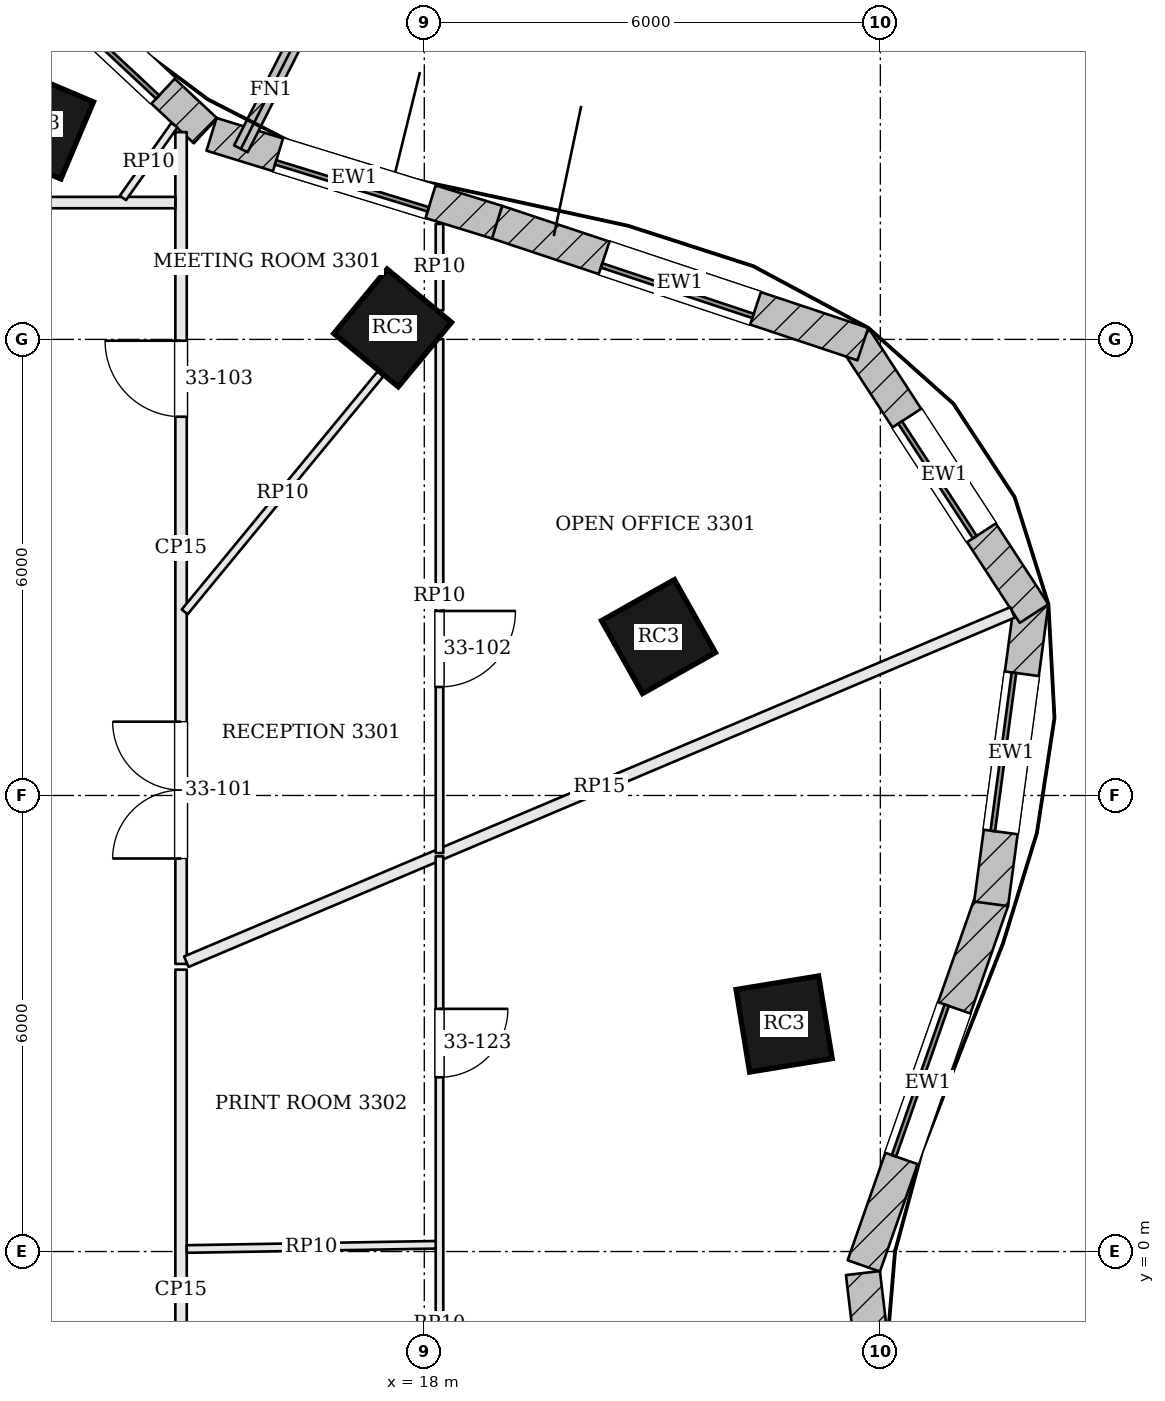
"""IFC4 building model, lengths in metres.
Left out: names, types, materials, properties, quantities, classifications, styles, units other than length and angle.
Written with IfcOpenShell. Run it as: python <this file> out.ifc"""

import sys

from ifc_helpers import new_model, si_unit, direction, frame, frame_2d, origin, origin_2d, place, context, subcontext, project, spatial, rectangle, extrude, element, fill, save


model = new_model("IFC4")
c1 = context("Model", 3, precision=1e-05, world=origin(), true_north=direction((0.0, 1.0)))
c2 = subcontext(c1, "Body", "Model", "MODEL_VIEW")
j1 = project(units=[si_unit("LENGTHUNIT", "METRE"), si_unit("PLANEANGLEUNIT", "RADIAN")], contexts=[c1])
p1 = place(None, origin())
s1 = spatial("IfcSite", under=j1, at=p1, CompositionType="ELEMENT")
p2 = place(p1, origin())
s2 = spatial("IfcBuilding", under=s1, at=p2, CompositionType="ELEMENT")
p3 = place(p2, frame((0.0, 0.0, 138.3)))
s3 = spatial("IfcBuildingStorey", under=s2, at=p3, CompositionType="ELEMENT", Elevation=138.3)
for number, where, z_axis, x_axis in (
    (1, (22.734, 2.993, 0.0), (0.0, 0.0, 1.0), (-0.162, 0.987, 0.0)),
    (2, (21.081, 8.09, 0.0), (0.0, 0.0, 1.0), (-0.49, 0.872, 0.0)),
    (3, (17.584, 12.151, 0.0), (0.0, 0.0, 1.0), (-0.771, 0.637, 0.0)),
    (4, (12.927, 14.832, 0.0), (0.0, 0.0, 1.0), (-0.921, 0.389, 0.0)),
):
    element("IfcColumn", number, at=place(p3, frame(where, z_axis=z_axis, x_axis=x_axis)), inside=s3, PredefinedType="COLUMN", context=c2, shape_type="SweptSolid", body=[
        extrude(rectangle(XDim=1.1, YDim=1.1, at=origin_2d()), origin(), (0.0, 0.0, 1.0), 3.9),
    ])
p4 = place(p3, frame((23.782, -0.189, 0.0), z_axis=(0.0, 0.0, 1.0), x_axis=(0.330794307703, 0.943702880144, 0.0)))
e5 = element("IfcWall", 5, at=p4, inside=s3, PredefinedType="SOLIDWALL", context=c2, shape_type="SweptSolid", body=[
    extrude(rectangle(XDim=5.095, YDim=0.45, at=frame_2d((2.548, 0.0))), origin(), (0.0, 0.0, 1.0), 3.7),
])
p5 = place(p4, frame((1.498, 0.0, 0.9)))
e6 = element("IfcOpeningElement", 6, at=p5, cuts=e5, PredefinedType="OPENING", context=c2, shape_type="SweptSolid", body=[
    extrude(rectangle(XDim=2.1, YDim=2.3, at=frame_2d((1.05, 1.15))), frame((0.0, 0.235, 0.0), z_axis=(0.0, -1.0, 0.0), x_axis=(1.0, 0.0, 0.0)), (0.0, 0.0, 1.0), 0.47),
])
p6 = place(p3, frame((25.457, 4.575, 0.0), z_axis=(0.0, 0.0, 1.0), x_axis=(0.132475046402, 0.991186340746, 0.0)))
e7 = element("IfcWall", 7, at=p6, inside=s3, PredefinedType="SOLIDWALL", context=c2, shape_type="SweptSolid", body=[
    extrude(rectangle(XDim=4.007, YDim=0.45, at=frame_2d((2.003, 0.0))), origin(), (0.0, 0.0, 1.0), 3.7),
])
p7 = place(p6, frame((0.953, 0.0, 0.9)))
e8 = element("IfcOpeningElement", 8, at=p7, cuts=e7, PredefinedType="OPENING", context=c2, shape_type="SweptSolid", body=[
    extrude(rectangle(XDim=2.1, YDim=2.3, at=frame_2d((1.05, 1.15))), frame((0.0, 0.235, 0.0), z_axis=(0.0, -1.0, 0.0), x_axis=(1.0, 0.0, 0.0)), (0.0, 0.0, 1.0), 0.47),
])
p8 = place(p3, frame((26.022, 8.393, 0.0), z_axis=(0.0, 0.0, 1.0), x_axis=(-0.545637310328, 0.838021435035, 0.0)))
e9 = element("IfcWall", 9, at=p8, inside=s3, PredefinedType="SOLIDWALL", context=c2, shape_type="SweptSolid", body=[
    extrude(rectangle(XDim=4.336, YDim=0.45, at=frame_2d((2.168, 0.0))), origin(), (0.0, 0.0, 1.0), 3.7),
])
p9 = place(p8, frame((1.268, 0.0, 0.9)))
e10 = element("IfcOpeningElement", 10, at=p9, cuts=e9, PredefinedType="OPENING", context=c2, shape_type="SweptSolid", body=[
    extrude(rectangle(XDim=1.8, YDim=2.3, at=frame_2d((0.9, 1.15))), frame((0.0, 0.235, 0.0), z_axis=(0.0, -1.0, 0.0), x_axis=(1.0, 0.0, 0.0)), (0.0, 0.0, 1.0), 0.47),
])
p10 = place(p3, frame((23.77, 11.938, 0.0), z_axis=(0.0, 0.0, 1.0), x_axis=(-0.948673679101, 0.316256621402, 0.0)))
e11 = element("IfcWall", 11, at=p10, inside=s3, PredefinedType="SOLIDWALL", context=c2, shape_type="SweptSolid", body=[
    extrude(rectangle(XDim=5.076, YDim=0.45, at=frame_2d((2.538, 0.0))), origin(), (0.0, 0.0, 1.0), 3.7),
])
p11 = place(p10, frame((1.488, 0.0, 0.9)))
e12 = element("IfcOpeningElement", 12, at=p11, cuts=e11, PredefinedType="OPENING", context=c2, shape_type="SweptSolid", body=[
    extrude(rectangle(XDim=2.1, YDim=2.3, at=frame_2d((1.05, 1.15))), frame((0.0, 0.235, 0.0), z_axis=(0.0, -1.0, 0.0), x_axis=(1.0, 0.0, 0.0)), (0.0, 0.0, 1.0), 0.47),
])
p12 = place(p3, frame((18.958, 13.542, 0.0), z_axis=(0.0, 0.0, 1.0), x_axis=(-0.955792437529, 0.294042201668, 0.0)))
e13 = element("IfcWall", 13, at=p12, inside=s3, PredefinedType="SOLIDWALL", context=c2, shape_type="SweptSolid", body=[
    extrude(rectangle(XDim=3.931, YDim=0.45, at=frame_2d((1.965, 0.0))), origin(), (0.0, 0.0, 1.0), 3.7),
])
p13 = place(p12, frame((0.915, 0.0, 0.9)))
e14 = element("IfcOpeningElement", 14, at=p13, cuts=e13, PredefinedType="OPENING", context=c2, shape_type="SweptSolid", body=[
    extrude(rectangle(XDim=2.1, YDim=2.3, at=frame_2d((1.05, 1.15))), frame((0.0, 0.235, 0.0), z_axis=(0.0, -1.0, 0.0), x_axis=(1.0, 0.0, 0.0)), (0.0, 0.0, 1.0), 0.47),
])
p14 = place(p3, frame((15.121, 14.745, 0.0), z_axis=(0.0, 0.0, 1.0), x_axis=(-0.730618259172, 0.68278617397, 0.0)))
e15 = element("IfcWall", 15, at=p14, inside=s3, PredefinedType="SOLIDWALL", context=c2, shape_type="SweptSolid", body=[
    extrude(rectangle(XDim=3.624, YDim=0.45, at=frame_2d((1.812, 0.0))), origin(), (0.0, 0.0, 1.0), 3.7),
])
p15 = place(p14, frame((0.762, 0.0, 0.9)))
e16 = element("IfcOpeningElement", 16, at=p15, cuts=e15, PredefinedType="OPENING", context=c2, shape_type="SweptSolid", body=[
    extrude(rectangle(XDim=2.1, YDim=2.3, at=frame_2d((1.05, 1.15))), frame((0.0, 0.235, 0.0), z_axis=(0.0, -1.0, 0.0), x_axis=(1.0, 0.0, 0.0)), (0.0, 0.0, 1.0), 0.47),
])
p16 = place(p3, frame((24.201, -3.915, 0.0), z_axis=(0.0, 0.0, 1.0), x_axis=(-0.117623597589, 0.993058250703, 0.0)))
e17 = element("IfcWall", 17, at=p16, inside=s3, PredefinedType="SOLIDWALL", context=c2, shape_type="SweptSolid", body=[
    extrude(rectangle(XDim=3.657, YDim=0.45, at=frame_2d((1.829, 0.0))), origin(), (0.0, 0.0, 1.0), 3.7),
])
p17 = place(p16, frame((0.779, 0.0, 0.9)))
e18 = element("IfcOpeningElement", 18, at=p17, cuts=e17, PredefinedType="OPENING", context=c2, shape_type="SweptSolid", body=[
    extrude(rectangle(XDim=2.1, YDim=2.3, at=frame_2d((1.05, 1.15))), frame((0.0, 0.235, 0.0), z_axis=(0.0, -1.0, 0.0), x_axis=(1.0, 0.0, 0.0)), (0.0, 0.0, 1.0), 0.47),
])
p18 = place(p3, frame((15.587, 14.507, 0.0), z_axis=(0.0, 0.0, 1.0), x_axis=(0.452117231361, 0.89195852432, 0.0)))
e19 = element("IfcWall", 19, at=p18, inside=s3, PredefinedType="SOLIDWALL", context=c2, shape_type="SweptSolid", body=[
    extrude(rectangle(XDim=1.75, YDim=0.2, at=frame_2d((0.875, 0.0))), origin(), (0.0, 0.0, 1.0), 3.7),
])
p19 = place(p3, frame((14.8, 3.784, 0.0), z_axis=(0.0, 0.0, 1.0), x_axis=(0.0, 1.0, 0.0)))
e20 = element("IfcWall", 20, at=p19, inside=s3, PredefinedType="PARTITIONING", context=c2, shape_type="SweptSolid", body=[
    extrude(rectangle(XDim=10.943, YDim=0.15, at=frame_2d((5.472, 0.0))), origin(), (0.0, 0.0, 1.0), 3.198),
])
p20 = place(p19, frame((1.387, 0.0, 0.0)))
e21 = element("IfcOpeningElement", 21, at=p20, cuts=e20, PredefinedType="OPENING", context=c2, shape_type="SweptSolid", body=[
    extrude(rectangle(XDim=1.8, YDim=2.1, at=frame_2d((0.9, 1.05))), frame((0.0, 0.085, 0.0), z_axis=(0.0, -1.0, 0.0), x_axis=(1.0, 0.0, 0.0)), (0.0, 0.0, 1.0), 0.17),
])
p21 = place(p19, frame((7.199, 0.0, 0.0)))
e22 = element("IfcOpeningElement", 22, at=p21, cuts=e20, PredefinedType="OPENING", context=c2, shape_type="SweptSolid", body=[
    extrude(rectangle(XDim=1.0, YDim=2.4, at=frame_2d((0.5, 1.2))), frame((0.0, 0.085, 0.0), z_axis=(0.0, -1.0, 0.0), x_axis=(1.0, 0.0, 0.0)), (0.0, 0.0, 1.0), 0.17),
])
p22 = place(p3, frame((14.725, 13.8, 0.0), z_axis=(0.0, 0.0, 1.0), x_axis=(-1.0, 0.0, 0.0)))
e23 = element("IfcWall", 23, at=p22, inside=s3, PredefinedType="PARTITIONING", context=c2, shape_type="SweptSolid", body=[
    extrude(rectangle(XDim=11.638, YDim=0.15, at=frame_2d((5.819, 0.0))), origin(), (0.0, 0.0, 1.0), 3.198),
])
p23 = place(p22, frame((2.95, 0.0, 0.0)))
e24 = element("IfcOpeningElement", 24, at=p23, cuts=e23, PredefinedType="OPENING", context=c2, shape_type="SweptSolid", body=[
    extrude(rectangle(XDim=1.0, YDim=2.1, at=frame_2d((0.5, 1.05))), frame((0.0, 0.085, 0.0), z_axis=(0.0, -1.0, 0.0), x_axis=(1.0, 0.0, 0.0)), (0.0, 0.0, 1.0), 0.17),
])
p24 = place(p22, frame((8.35, 0.0, 0.0)))
e25 = element("IfcOpeningElement", 25, at=p24, cuts=e23, PredefinedType="OPENING", context=c2, shape_type="SweptSolid", body=[
    extrude(rectangle(XDim=1.0, YDim=2.1, at=frame_2d((0.5, 1.05))), frame((0.0, 0.085, 0.0), z_axis=(0.0, -1.0, 0.0), x_axis=(1.0, 0.0, 0.0)), (0.0, 0.0, 1.0), 0.17),
])
p25 = place(p3, frame((25.739, 8.408, 0.0), z_axis=(0.0, 0.0, 1.0), x_axis=(-0.921062306608, -0.389415237692, 0.0)))
e26 = element("IfcWall", 26, at=p25, inside=s3, PredefinedType="PARTITIONING", context=c2, shape_type="SweptSolid", body=[
    extrude(rectangle(XDim=11.801, YDim=0.15, at=frame_2d((5.9, 0.0))), origin(), (0.0, 0.0, 1.0), 3.198),
])
p26 = place(p3, frame((14.8, -4.725, 0.0), z_axis=(0.0, 0.0, 1.0), x_axis=(0.0, 1.0, 0.0)))
e27 = element("IfcWall", 27, at=p26, inside=s3, PredefinedType="PARTITIONING", context=c2, shape_type="SweptSolid", body=[
    extrude(rectangle(XDim=8.434, YDim=0.15, at=frame_2d((4.217, 0.0))), origin(), (0.0, 0.0, 1.0), 3.198),
])
p27 = place(p26, frame((0.45, 0.0, 0.0)))
e28 = element("IfcOpeningElement", 28, at=p27, cuts=e27, PredefinedType="OPENING", context=c2, shape_type="SweptSolid", body=[
    extrude(rectangle(XDim=1.0, YDim=2.4, at=frame_2d((0.5, 1.2))), frame((0.0, 0.085, 0.0), z_axis=(0.0, -1.0, 0.0), x_axis=(1.0, 0.0, 0.0)), (0.0, 0.0, 1.0), 0.17),
])
p28 = place(p3, frame((18.2, 13.519, 0.0), z_axis=(0.0, 0.0, 1.0), x_axis=(0.0, -1.0, 0.0)))
e29 = element("IfcWall", 29, at=p28, inside=s3, PredefinedType="PARTITIONING", context=c2, shape_type="SweptSolid", body=[
    extrude(rectangle(XDim=1.138, YDim=0.1, at=frame_2d((0.569, 0.0))), origin(), (0.0, 0.0, 1.0), 3.184),
])
p29 = place(p3, frame((18.2, 12.001, 0.0), z_axis=(0.0, 0.0, 1.0), x_axis=(0.0, -1.0, 0.0)))
e30 = element("IfcWall", 30, at=p29, inside=s3, PredefinedType="PARTITIONING", context=c2, shape_type="SweptSolid", body=[
    extrude(rectangle(XDim=6.759, YDim=0.1, at=frame_2d((3.379, 0.0))), origin(), (0.0, 0.0, 1.0), 3.184),
])
p30 = place(p29, frame((3.574, 0.0, 0.0)))
e31 = element("IfcOpeningElement", 31, at=p30, cuts=e30, PredefinedType="OPENING", context=c2, shape_type="SweptSolid", body=[
    extrude(rectangle(XDim=1.0, YDim=2.1, at=frame_2d((0.5, 1.05))), frame((0.0, 0.06, 0.0), z_axis=(0.0, -1.0, 0.0), x_axis=(1.0, 0.0, 0.0)), (0.0, 0.0, 1.0), 0.12),
])
p31 = place(p3, frame((14.848, 8.415, 0.0), z_axis=(0.0, 0.0, 1.0), x_axis=(0.63542004032, 0.77216667395, 0.0)))
e32 = element("IfcWall", 32, at=p31, inside=s3, PredefinedType="PARTITIONING", context=c2, shape_type="SweptSolid", body=[
    extrude(rectangle(XDim=4.053, YDim=0.1, at=frame_2d((2.026, 0.0))), origin(), (0.0, 0.0, 1.0), 3.184),
])
p32 = place(p3, frame((14.035, 13.861, 0.0), z_axis=(0.0, 0.0, 1.0), x_axis=(0.57745118401, 0.816425214019, 0.0)))
e33 = element("IfcWall", 33, at=p32, inside=s3, PredefinedType="PARTITIONING", context=c2, shape_type="SweptSolid", body=[
    extrude(rectangle(XDim=1.173, YDim=0.1, at=frame_2d((0.586, 0.0))), origin(), (0.0, 0.0, 1.0), 3.184),
])
p33 = place(p3, frame((18.2, 5.199, 0.0), z_axis=(0.0, 0.0, 1.0), x_axis=(0.0, -1.0, 0.0)))
e34 = element("IfcWall", 34, at=p33, inside=s3, PredefinedType="PARTITIONING", context=c2, shape_type="SweptSolid", body=[
    extrude(rectangle(XDim=13.399, YDim=0.1, at=frame_2d((6.7, 0.0))), origin(), (0.0, 0.0, 1.0), 3.184),
])
p34 = place(p33, frame((6.227, 0.0, 0.0)))
e35 = element("IfcOpeningElement", 35, at=p34, cuts=e34, PredefinedType="OPENING", context=c2, shape_type="SweptSolid", body=[
    extrude(rectangle(XDim=0.9, YDim=2.1, at=frame_2d((0.45, 1.05))), frame((0.0, 0.06, 0.0), z_axis=(0.0, -1.0, 0.0), x_axis=(1.0, 0.0, 0.0)), (0.0, 0.0, 1.0), 0.12),
])
p35 = place(p33, frame((2.007, 0.0, 0.0)))
e36 = element("IfcOpeningElement", 36, at=p35, cuts=e34, PredefinedType="OPENING", context=c2, shape_type="SweptSolid", body=[
    extrude(rectangle(XDim=0.9, YDim=2.1, at=frame_2d((0.45, 1.05))), frame((0.0, 0.06, 0.0), z_axis=(0.0, -1.0, 0.0), x_axis=(1.0, 0.0, 0.0)), (0.0, 0.0, 1.0), 0.12),
])
p36 = place(p3, frame((14.875, 0.033, 0.0), z_axis=(0.0, 0.0, 1.0), x_axis=(0.999856843244, 0.016920195573, 0.0)))
e37 = element("IfcWall", 37, at=p36, inside=s3, PredefinedType="PARTITIONING", context=c2, shape_type="SweptSolid", body=[
    extrude(rectangle(XDim=3.275, YDim=0.1, at=frame_2d((1.638, 0.0))), origin(), (0.0, 0.0, 1.0), 3.184),
])
p37 = place(p5, origin())
e38 = element("IfcWindow", 38, at=p37, inside=s3, PartitioningType="SINGLE_PANEL", PredefinedType="WINDOW", context=c2, shape_type="SweptSolid", body=[
    extrude(rectangle(XDim=2.1, YDim=2.3, at=frame_2d((1.05, 1.15))), frame((0.0, 0.135, 0.0), z_axis=(0.0, -1.0, 0.0), x_axis=(1.0, 0.0, 0.0)), (0.0, 0.0, 1.0), 0.06),
])
fill(e6, e38)
p38 = place(p7, origin())
e39 = element("IfcWindow", 39, at=p38, inside=s3, PartitioningType="SINGLE_PANEL", PredefinedType="WINDOW", context=c2, shape_type="SweptSolid", body=[
    extrude(rectangle(XDim=2.1, YDim=2.3, at=frame_2d((1.05, 1.15))), frame((0.0, 0.135, 0.0), z_axis=(0.0, -1.0, 0.0), x_axis=(1.0, 0.0, 0.0)), (0.0, 0.0, 1.0), 0.06),
])
fill(e8, e39)
p39 = place(p9, origin())
e40 = element("IfcWindow", 40, at=p39, inside=s3, PartitioningType="SINGLE_PANEL", PredefinedType="WINDOW", context=c2, shape_type="SweptSolid", body=[
    extrude(rectangle(XDim=1.8, YDim=2.3, at=frame_2d((0.9, 1.15))), frame((0.0, 0.135, 0.0), z_axis=(0.0, -1.0, 0.0), x_axis=(1.0, 0.0, 0.0)), (0.0, 0.0, 1.0), 0.06),
])
fill(e10, e40)
p40 = place(p11, origin())
e41 = element("IfcWindow", 41, at=p40, inside=s3, PartitioningType="SINGLE_PANEL", PredefinedType="WINDOW", context=c2, shape_type="SweptSolid", body=[
    extrude(rectangle(XDim=2.1, YDim=2.3, at=frame_2d((1.05, 1.15))), frame((0.0, 0.135, 0.0), z_axis=(0.0, -1.0, 0.0), x_axis=(1.0, 0.0, 0.0)), (0.0, 0.0, 1.0), 0.06),
])
fill(e12, e41)
p41 = place(p13, origin())
e42 = element("IfcWindow", 42, at=p41, inside=s3, PartitioningType="SINGLE_PANEL", PredefinedType="WINDOW", context=c2, shape_type="SweptSolid", body=[
    extrude(rectangle(XDim=2.1, YDim=2.3, at=frame_2d((1.05, 1.15))), frame((0.0, 0.135, 0.0), z_axis=(0.0, -1.0, 0.0), x_axis=(1.0, 0.0, 0.0)), (0.0, 0.0, 1.0), 0.06),
])
fill(e14, e42)
p42 = place(p15, origin())
e43 = element("IfcWindow", 43, at=p42, inside=s3, PartitioningType="SINGLE_PANEL", PredefinedType="WINDOW", context=c2, shape_type="SweptSolid", body=[
    extrude(rectangle(XDim=2.1, YDim=2.3, at=frame_2d((1.05, 1.15))), frame((0.0, 0.135, 0.0), z_axis=(0.0, -1.0, 0.0), x_axis=(1.0, 0.0, 0.0)), (0.0, 0.0, 1.0), 0.06),
])
fill(e16, e43)
p43 = place(p20, origin())
e44 = element("IfcDoor", 44, at=p43, inside=s3, OperationType="DOUBLE_DOOR_SINGLE_SWING", PredefinedType="DOOR", context=c2, shape_type="SweptSolid", body=[
    extrude(rectangle(XDim=1.8, YDim=2.1, at=frame_2d((0.9, 1.05))), frame((0.0, 0.025, 0.0), z_axis=(0.0, -1.0, 0.0), x_axis=(1.0, 0.0, 0.0)), (0.0, 0.0, 1.0), 0.05),
])
fill(e21, e44)
p44 = place(p30, origin())
e45 = element("IfcDoor", 45, at=p44, inside=s3, OperationType="SINGLE_SWING_LEFT", PredefinedType="DOOR", context=c2, shape_type="SweptSolid", body=[
    extrude(rectangle(XDim=1.0, YDim=2.1, at=frame_2d((0.5, 1.05))), frame((0.0, 0.025, 0.0), z_axis=(0.0, -1.0, 0.0), x_axis=(1.0, 0.0, 0.0)), (0.0, 0.0, 1.0), 0.05),
])
fill(e31, e45)
p45 = place(p21, origin())
e46 = element("IfcDoor", 46, at=p45, inside=s3, OperationType="SINGLE_SWING_RIGHT", PredefinedType="DOOR", context=c2, shape_type="SweptSolid", body=[
    extrude(rectangle(XDim=1.0, YDim=2.4, at=frame_2d((0.5, 1.2))), frame((0.0, 0.025, 0.0), z_axis=(0.0, -1.0, 0.0), x_axis=(1.0, 0.0, 0.0)), (0.0, 0.0, 1.0), 0.05),
])
fill(e22, e46)
p46 = place(p35, origin())
e47 = element("IfcDoor", 47, at=p46, inside=s3, OperationType="SINGLE_SWING_LEFT", PredefinedType="DOOR", context=c2, shape_type="SweptSolid", body=[
    extrude(rectangle(XDim=0.9, YDim=2.1, at=frame_2d((0.45, 1.05))), frame((0.0, 0.025, 0.0), z_axis=(0.0, -1.0, 0.0), x_axis=(1.0, 0.0, 0.0)), (0.0, 0.0, 1.0), 0.05),
])
fill(e36, e47)
save(model, sys.argv[1])
